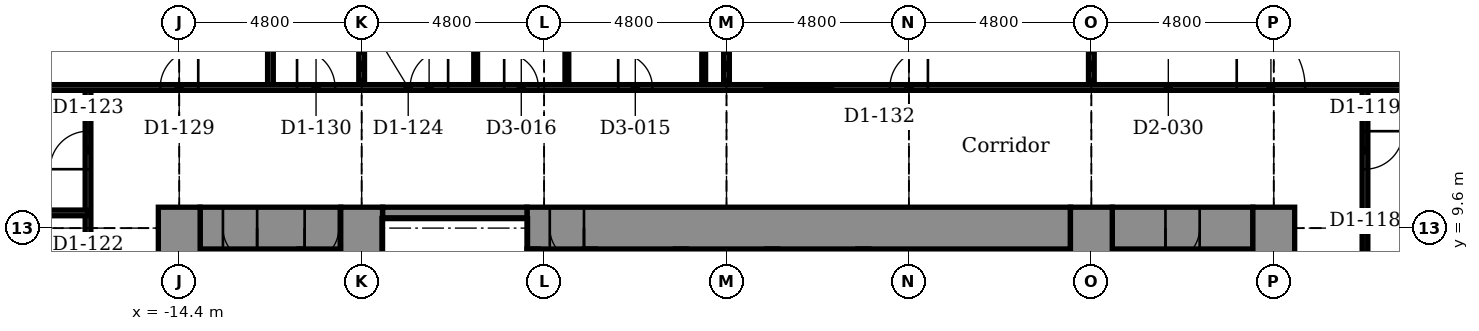
"""IFC4 building model, lengths in metres.
Left out: names, types, materials, properties, quantities, classifications, styles, units other than length and angle.
Written with IfcOpenShell. Run it as: python <this file> out.ifc"""

import sys

from ifc_helpers import new_model, si_unit, direction, frame, frame_2d, origin, place, context, subcontext, project, spatial, rectangle, extrude, element, fill, save


model = new_model("IFC4")
c1 = context("Model", 3, precision=1e-05, world=origin(), true_north=direction((0.0, 1.0)))
c2 = subcontext(c1, "Body", "Model", "MODEL_VIEW")
j1 = project(units=[si_unit("LENGTHUNIT", "METRE"), si_unit("PLANEANGLEUNIT", "RADIAN")], contexts=[c1])
p1 = place(None, origin())
s1 = spatial("IfcSite", under=j1, at=p1, CompositionType="ELEMENT")
p2 = place(p1, origin())
s2 = spatial("IfcBuilding", under=s1, at=p2, CompositionType="ELEMENT")
p3 = place(p2, frame((0.0, 0.0, 44.4)))
s3 = spatial("IfcBuildingStorey", under=s2, at=p3, CompositionType="ELEMENT", Elevation=44.4)
p4 = place(p3, frame((-13.85, 9.6, -0.25), z_axis=(0.0, 0.0, 1.0), x_axis=(1.0, 0.0, 0.0)))
e1 = element("IfcWall", 1, at=p4, inside=s3, PredefinedType="SHEAR", context=c2, shape_type="SweptSolid", body=[
    extrude(rectangle(XDim=3.7, YDim=1.1, at=frame_2d((1.85, 0.0))), origin(), (0.0, 0.0, 1.0), 5.5),
])
p5 = place(p4, frame((0.6, 0.0, 0.25)))
e2 = element("IfcOpeningElement", 2, at=p5, cuts=e1, PredefinedType="OPENING", context=c2, shape_type="SweptSolid", body=[
    extrude(rectangle(XDim=0.9, YDim=2.1, at=frame_2d((0.45, 1.05))), frame((0.0, 0.56, 0.0), z_axis=(0.0, -1.0, 0.0), x_axis=(1.0, 0.0, 0.0)), (0.0, 0.0, 1.0), 1.12),
])
p6 = place(p4, frame((2.75, 0.0, 0.25)))
e3 = element("IfcOpeningElement", 3, at=p6, cuts=e1, PredefinedType="OPENING", context=c2, shape_type="SweptSolid", body=[
    extrude(rectangle(XDim=0.9, YDim=2.1, at=frame_2d((0.45, 1.05))), frame((0.0, 0.56, 0.0), z_axis=(0.0, -1.0, 0.0), x_axis=(1.0, 0.0, 0.0)), (0.0, 0.0, 1.0), 1.12),
])
p7 = place(p3, frame((-5.25, 9.6, -0.25), z_axis=(0.0, 0.0, 1.0), x_axis=(1.0, 0.0, 0.0)))
e4 = element("IfcWall", 4, at=p7, inside=s3, PredefinedType="SHEAR", context=c2, shape_type="SweptSolid", body=[
    extrude(rectangle(XDim=14.3, YDim=1.1, at=frame_2d((7.15, 0.0))), origin(), (0.0, 0.0, 1.0), 5.5),
])
p8 = place(p7, frame((0.6, 0.0, 0.25)))
e5 = element("IfcOpeningElement", 5, at=p8, cuts=e4, PredefinedType="OPENING", context=c2, shape_type="SweptSolid", body=[
    extrude(rectangle(XDim=0.9, YDim=2.1, at=frame_2d((0.45, 1.05))), frame((0.0, 0.56, 0.0), z_axis=(0.0, -1.0, 0.0), x_axis=(1.0, 0.0, 0.0)), (0.0, 0.0, 1.0), 1.12),
])
p9 = place(p3, frame((10.15, 9.6, -0.25), z_axis=(0.0, 0.0, 1.0), x_axis=(1.0, 0.0, 0.0)))
e6 = element("IfcWall", 6, at=p9, inside=s3, PredefinedType="SHEAR", context=c2, shape_type="SweptSolid", body=[
    extrude(rectangle(XDim=3.7, YDim=1.1, at=frame_2d((1.85, 0.0))), origin(), (0.0, 0.0, 1.0), 5.5),
])
p10 = place(p9, frame((1.4, 0.0, 0.25)))
e7 = element("IfcOpeningElement", 7, at=p10, cuts=e6, PredefinedType="OPENING", context=c2, shape_type="SweptSolid", body=[
    extrude(rectangle(XDim=0.9, YDim=2.1, at=frame_2d((0.45, 1.05))), frame((0.0, 0.56, 0.0), z_axis=(0.0, -1.0, 0.0), x_axis=(1.0, 0.0, 0.0)), (0.0, 0.0, 1.0), 1.12),
])
p11 = place(p3, frame((-9.05, 10.0, -0.25), z_axis=(0.0, 0.0, 1.0), x_axis=(1.0, 0.0, 0.0)))
e8 = element("IfcWall", 8, at=p11, inside=s3, PredefinedType="STANDARD", context=c2, shape_type="SweptSolid", body=[
    extrude(rectangle(XDim=3.8, YDim=0.3, at=frame_2d((1.9, 0.0))), origin(), (0.0, 0.0, 1.0), 5.5),
])
p12 = place(p3, frame((-14.4, -10.15, -0.25), z_axis=(0.0, 0.0, 1.0), x_axis=(0.0, 1.0, 0.0)))
e9 = element("IfcWall", 9, at=p12, inside=s3, PredefinedType="SHEAR", context=c2, shape_type="SweptSolid", body=[
    extrude(rectangle(XDim=20.3, YDim=1.1, at=frame_2d((10.15, 0.0))), origin(), (0.0, 0.0, 1.0), 5.5),
])
p13 = place(p12, frame((3.6, 0.0, 0.25)))
e10 = element("IfcOpeningElement", 10, at=p13, cuts=e9, PredefinedType="OPENING", context=c2, shape_type="SweptSolid", body=[
    extrude(rectangle(XDim=1.1, YDim=2.1, at=frame_2d((0.55, 1.05))), frame((0.0, 0.56, 0.0), z_axis=(0.0, -1.0, 0.0), x_axis=(1.0, 0.0, 0.0)), (0.0, 0.0, 1.0), 1.12),
])
p14 = place(p12, frame((6.0, 0.0, 0.25)))
e11 = element("IfcOpeningElement", 11, at=p14, cuts=e9, PredefinedType="OPENING", context=c2, shape_type="SweptSolid", body=[
    extrude(rectangle(XDim=1.1, YDim=2.1, at=frame_2d((0.55, 1.05))), frame((0.0, 0.56, 0.0), z_axis=(0.0, -1.0, 0.0), x_axis=(1.0, 0.0, 0.0)), (0.0, 0.0, 1.0), 1.12),
])
p15 = place(p12, frame((8.4, 0.0, 0.25)))
e12 = element("IfcOpeningElement", 12, at=p15, cuts=e9, PredefinedType="OPENING", context=c2, shape_type="SweptSolid", body=[
    extrude(rectangle(XDim=1.1, YDim=2.1, at=frame_2d((0.55, 1.05))), frame((0.0, 0.56, 0.0), z_axis=(0.0, -1.0, 0.0), x_axis=(1.0, 0.0, 0.0)), (0.0, 0.0, 1.0), 1.12),
])
p16 = place(p12, frame((10.8, 0.0, 0.25)))
e13 = element("IfcOpeningElement", 13, at=p16, cuts=e9, PredefinedType="OPENING", context=c2, shape_type="SweptSolid", body=[
    extrude(rectangle(XDim=1.1, YDim=2.1, at=frame_2d((0.55, 1.05))), frame((0.0, 0.56, 0.0), z_axis=(0.0, -1.0, 0.0), x_axis=(1.0, 0.0, 0.0)), (0.0, 0.0, 1.0), 1.12),
])
p17 = place(p3, frame((-9.6, 2.55, -0.25), z_axis=(0.0, 0.0, 1.0), x_axis=(0.0, 1.0, 0.0)))
e14 = element("IfcWall", 14, at=p17, inside=s3, PredefinedType="SHEAR", context=c2, shape_type="SweptSolid", body=[
    extrude(rectangle(XDim=7.6, YDim=1.1, at=frame_2d((3.8, 0.0))), origin(), (0.0, 0.0, 1.0), 5.5),
])
p18 = place(p3, frame((-5.1, 2.25, -0.25), z_axis=(0.0, 0.0, 1.0), x_axis=(0.0, 1.0, 0.0)))
e15 = element("IfcWall", 15, at=p18, inside=s3, PredefinedType="STANDARD", context=c2, shape_type="SweptSolid", body=[
    extrude(rectangle(XDim=6.8, YDim=0.3, at=frame_2d((3.4, 0.0))), origin(), (0.0, 0.0, 1.0), 5.5),
])
p19 = place(p18, frame((2.0, 0.0, 0.25)))
e16 = element("IfcOpeningElement", 16, at=p19, cuts=e15, PredefinedType="OPENING", context=c2, shape_type="SweptSolid", body=[
    extrude(rectangle(XDim=1.2, YDim=2.1, at=frame_2d((0.6, 1.05))), frame((0.0, 0.16, 0.0), z_axis=(0.0, -1.0, 0.0), x_axis=(1.0, 0.0, 0.0)), (0.0, 0.0, 1.0), 0.32),
])
for number, where, z_axis, x_axis in (
    (17, (-3.6, 5.85, -0.25), (0.0, 0.0, 1.0), (0.0, 1.0, 0.0)),
    (18, (-1.2, 5.85, -0.25), (0.0, 0.0, 1.0), (0.0, 1.0, 0.0)),
    (19, (1.2, 5.85, -0.25), (0.0, 0.0, 1.0), (0.0, 1.0, 0.0)),
    (20, (3.6, 5.85, -0.25), (0.0, 0.0, 1.0), (0.0, 1.0, 0.0)),
):
    element("IfcWall", number, at=place(p3, frame(where, z_axis=z_axis, x_axis=x_axis)), inside=s3, PredefinedType="STANDARD", context=c2, shape_type="SweptSolid", body=[
        extrude(rectangle(XDim=3.2, YDim=0.3, at=frame_2d((1.6, 0.0))), origin(), (0.0, 0.0, 1.0), 5.5),
    ])
p20 = place(p3, frame((9.6, -10.15, -0.25), z_axis=(0.0, 0.0, 1.0), x_axis=(0.0, 1.0, 0.0)))
e21 = element("IfcWall", 21, at=p20, inside=s3, PredefinedType="SHEAR", context=c2, shape_type="SweptSolid", body=[
    extrude(rectangle(XDim=20.3, YDim=1.1, at=frame_2d((10.15, 0.0))), origin(), (0.0, 0.0, 1.0), 5.5),
])
p21 = place(p3, frame((14.4, -10.15, -0.25), z_axis=(0.0, 0.0, 1.0), x_axis=(0.0, 1.0, 0.0)))
e22 = element("IfcWall", 22, at=p21, inside=s3, PredefinedType="SHEAR", context=c2, shape_type="SweptSolid", body=[
    extrude(rectangle(XDim=20.3, YDim=1.1, at=frame_2d((10.15, 0.0))), origin(), (0.0, 0.0, 1.0), 5.5),
])
p22 = place(p21, frame((3.6, 0.0, 0.25)))
e23 = element("IfcOpeningElement", 23, at=p22, cuts=e22, PredefinedType="OPENING", context=c2, shape_type="SweptSolid", body=[
    extrude(rectangle(XDim=1.1, YDim=2.1, at=frame_2d((0.55, 1.05))), frame((0.0, 0.56, 0.0), z_axis=(0.0, -1.0, 0.0), x_axis=(1.0, 0.0, 0.0)), (0.0, 0.0, 1.0), 1.12),
])
p23 = place(p21, frame((6.0, 0.0, 0.25)))
e24 = element("IfcOpeningElement", 24, at=p23, cuts=e22, PredefinedType="OPENING", context=c2, shape_type="SweptSolid", body=[
    extrude(rectangle(XDim=1.1, YDim=2.1, at=frame_2d((0.55, 1.05))), frame((0.0, 0.56, 0.0), z_axis=(0.0, -1.0, 0.0), x_axis=(1.0, 0.0, 0.0)), (0.0, 0.0, 1.0), 1.12),
])
p24 = place(p21, frame((8.4, 0.0, 0.25)))
e25 = element("IfcOpeningElement", 25, at=p24, cuts=e22, PredefinedType="OPENING", context=c2, shape_type="SweptSolid", body=[
    extrude(rectangle(XDim=1.1, YDim=2.1, at=frame_2d((0.55, 1.05))), frame((0.0, 0.56, 0.0), z_axis=(0.0, -1.0, 0.0), x_axis=(1.0, 0.0, 0.0)), (0.0, 0.0, 1.0), 1.12),
])
p25 = place(p21, frame((10.8, 0.0, 0.25)))
e26 = element("IfcOpeningElement", 26, at=p25, cuts=e22, PredefinedType="OPENING", context=c2, shape_type="SweptSolid", body=[
    extrude(rectangle(XDim=1.1, YDim=2.1, at=frame_2d((0.55, 1.05))), frame((0.0, 0.56, 0.0), z_axis=(0.0, -1.0, 0.0), x_axis=(1.0, 0.0, 0.0)), (0.0, 0.0, 1.0), 1.12),
])
p26 = place(p3, frame((16.8, 3.95, 0.0), z_axis=(0.0, 0.0, 1.0), x_axis=(0.0, 1.0, 0.0)))
e27 = element("IfcWall", 27, at=p26, inside=s3, PredefinedType="PARTITIONING", context=c2, shape_type="SweptSolid", body=[
    extrude(rectangle(XDim=9.35, YDim=0.15, at=frame_2d((4.675, 0.0))), origin(), (0.0, 0.0, 1.0), 5.25),
])
p27 = place(p26, frame((1.275, 0.0, 0.0)))
e28 = element("IfcOpeningElement", 28, at=p27, cuts=e27, PredefinedType="OPENING", context=c2, shape_type="SweptSolid", body=[
    extrude(rectangle(XDim=1.0, YDim=2.1, at=frame_2d((0.5, 1.05))), frame((0.0, 0.085, 0.0), z_axis=(0.0, -1.0, 0.0), x_axis=(1.0, 0.0, 0.0)), (0.0, 0.0, 1.0), 0.17),
])
p28 = place(p26, frame((3.745, 0.0, 0.0)))
e29 = element("IfcOpeningElement", 29, at=p28, cuts=e27, PredefinedType="OPENING", context=c2, shape_type="SweptSolid", body=[
    extrude(rectangle(XDim=1.0, YDim=2.1, at=frame_2d((0.5, 1.05))), frame((0.0, 0.085, 0.0), z_axis=(0.0, -1.0, 0.0), x_axis=(1.0, 0.0, 0.0)), (0.0, 0.0, 1.0), 0.17),
])
p29 = place(p26, frame((7.2, 0.0, 0.0)))
e30 = element("IfcOpeningElement", 30, at=p29, cuts=e27, PredefinedType="OPENING", context=c2, shape_type="SweptSolid", body=[
    extrude(rectangle(XDim=1.0, YDim=2.1, at=frame_2d((0.5, 1.05))), frame((0.0, 0.085, 0.0), z_axis=(0.0, -1.0, 0.0), x_axis=(1.0, 0.0, 0.0)), (0.0, 0.0, 1.0), 0.17),
])
for number, where, z_axis, x_axis in (
    (31, (9.6, 13.3, 0.0), (0.0, 0.0, 1.0), (0.0, 1.0, 0.0)),
    (32, (0.0, 13.3, 0.0), (0.0, 0.0, 1.0), (0.0, 1.0, 0.0)),
):
    element("IfcWall", number, at=place(p3, frame(where, z_axis=z_axis, x_axis=x_axis)), inside=s3, PredefinedType="PARTITIONING", context=c2, shape_type="SweptSolid", body=[
        extrude(rectangle(XDim=5.3, YDim=0.15, at=frame_2d((2.65, 0.0))), origin(), (0.0, 0.0, 1.0), 4.793),
    ])
for number, where, z_axis, x_axis in (
    (33, (-0.6, 13.3, 0.0), (0.0, 0.0, 1.0), (0.0, 1.0, 0.0)),
    (34, (-4.2, 13.3, 0.0), (0.0, 0.0, 1.0), (0.0, 1.0, 0.0)),
    (35, (-6.6, 13.3, 0.0), (0.0, 0.0, 1.0), (0.0, 1.0, 0.0)),
):
    element("IfcWall", number, at=place(p3, frame(where, z_axis=z_axis, x_axis=x_axis)), inside=s3, PredefinedType="PARTITIONING", context=c2, shape_type="SweptSolid", body=[
        extrude(rectangle(XDim=4.8, YDim=0.1, at=frame_2d((2.4, 0.0))), origin(), (0.0, 0.0, 1.0), 5.25),
    ])
p30 = place(p3, frame((-9.6, 13.3, 0.0), z_axis=(0.0, 0.0, 1.0), x_axis=(0.0, 1.0, 0.0)))
e36 = element("IfcWall", 36, at=p30, inside=s3, PredefinedType="PARTITIONING", context=c2, shape_type="SweptSolid", body=[
    extrude(rectangle(XDim=5.3, YDim=0.15, at=frame_2d((2.65, 0.0))), origin(), (0.0, 0.0, 1.0), 4.793),
])
p31 = place(p3, frame((-11.2, 7.35, 0.0), z_axis=(0.0, 0.0, 1.0), x_axis=(0.0, 1.0, 0.0)))
e37 = element("IfcWall", 37, at=p31, inside=s3, PredefinedType="PARTITIONING", context=c2, shape_type="SweptSolid", body=[
    extrude(rectangle(XDim=1.7, YDim=0.1, at=frame_2d((0.85, 0.0))), origin(), (0.0, 0.0, 1.0), 5.25),
])
p32 = place(p3, frame((-12.0, 13.3, 0.0), z_axis=(0.0, 0.0, 1.0), x_axis=(0.0, 1.0, 0.0)))
e38 = element("IfcWall", 38, at=p32, inside=s3, PredefinedType="PARTITIONING", context=c2, shape_type="SweptSolid", body=[
    extrude(rectangle(XDim=18.285, YDim=0.15, at=frame_2d((9.143, 0.0))), origin(), (0.0, 0.0, 1.0), 5.25),
])
p33 = place(p3, frame((-16.8, 3.95, 0.0), z_axis=(0.0, 0.0, 1.0), x_axis=(0.0, 1.0, 0.0)))
e39 = element("IfcWall", 39, at=p33, inside=s3, PredefinedType="PARTITIONING", context=c2, shape_type="SweptSolid", body=[
    extrude(rectangle(XDim=9.35, YDim=0.15, at=frame_2d((4.675, 0.0))), origin(), (0.0, 0.0, 1.0), 5.25),
])
p34 = place(p33, frame((3.615, 0.0, 0.0)))
e40 = element("IfcOpeningElement", 40, at=p34, cuts=e39, PredefinedType="OPENING", context=c2, shape_type="SweptSolid", body=[
    extrude(rectangle(XDim=1.0, YDim=2.1, at=frame_2d((0.5, 1.05))), frame((0.0, 0.085, 0.0), z_axis=(0.0, -1.0, 0.0), x_axis=(1.0, 0.0, 0.0)), (0.0, 0.0, 1.0), 0.17),
])
p35 = place(p33, frame((7.2, 0.0, 0.0)))
e41 = element("IfcOpeningElement", 41, at=p35, cuts=e39, PredefinedType="OPENING", context=c2, shape_type="SweptSolid", body=[
    extrude(rectangle(XDim=1.0, YDim=2.1, at=frame_2d((0.5, 1.05))), frame((0.0, 0.085, 0.0), z_axis=(0.0, -1.0, 0.0), x_axis=(1.0, 0.0, 0.0)), (0.0, 0.0, 1.0), 0.17),
])
p36 = place(p3, frame((16.8, 9.6, 0.0), z_axis=(0.0, 0.0, 1.0), x_axis=(1.0, 0.0, 0.0)))
e42 = element("IfcWall", 42, at=p36, inside=s3, PredefinedType="PARTITIONING", context=c2, shape_type="SweptSolid", body=[
    extrude(rectangle(XDim=1.8, YDim=0.15, at=frame_2d((0.9, 0.0))), origin(), (0.0, 0.0, 1.0), 4.642),
])
p37 = place(p3, frame((-18.6, 10.0, 0.0), z_axis=(0.0, 0.0, 1.0), x_axis=(1.0, 0.0, 0.0)))
e43 = element("IfcWall", 43, at=p37, inside=s3, PredefinedType="PARTITIONING", context=c2, shape_type="SweptSolid", body=[
    extrude(rectangle(XDim=1.8, YDim=0.15, at=frame_2d((0.9, 0.0))), origin(), (0.0, 0.0, 1.0), 5.25),
])
p38 = place(p3, frame((-24.0, 13.3, 0.0), z_axis=(0.0, 0.0, 1.0), x_axis=(1.0, 0.0, 0.0)))
e44 = element("IfcWall", 44, at=p38, inside=s3, PredefinedType="PARTITIONING", context=c2, shape_type="SweptSolid", body=[
    extrude(rectangle(XDim=48.0, YDim=0.15, at=frame_2d((24.0, 0.0))), origin(), (0.0, 0.0, 1.0), 5.25),
])
p39 = place(p38, frame((9.1, 0.0, 0.0)))
e45 = element("IfcOpeningElement", 45, at=p39, cuts=e44, PredefinedType="OPENING", context=c2, shape_type="SweptSolid", body=[
    extrude(rectangle(XDim=1.0, YDim=2.1, at=frame_2d((0.5, 1.05))), frame((0.0, 0.085, 0.0), z_axis=(0.0, -1.0, 0.0), x_axis=(1.0, 0.0, 0.0)), (0.0, 0.0, 1.0), 0.17),
])
p40 = place(p38, frame((12.7, 0.0, 0.0)))
e46 = element("IfcOpeningElement", 46, at=p40, cuts=e44, PredefinedType="OPENING", context=c2, shape_type="SweptSolid", body=[
    extrude(rectangle(XDim=1.0, YDim=2.1, at=frame_2d((0.5, 1.05))), frame((0.0, 0.085, 0.0), z_axis=(0.0, -1.0, 0.0), x_axis=(1.0, 0.0, 0.0)), (0.0, 0.0, 1.0), 0.17),
])
p41 = place(p38, frame((15.675, 0.0, 0.0)))
e47 = element("IfcOpeningElement", 47, at=p41, cuts=e44, PredefinedType="OPENING", context=c2, shape_type="SweptSolid", body=[
    extrude(rectangle(XDim=1.0, YDim=2.1, at=frame_2d((0.5, 1.05))), frame((0.0, 0.085, 0.0), z_axis=(0.0, -1.0, 0.0), x_axis=(1.0, 0.0, 0.0)), (0.0, 0.0, 1.0), 0.17),
])
p42 = place(p38, frame((28.3, 0.0, 0.0)))
e48 = element("IfcOpeningElement", 48, at=p42, cuts=e44, PredefinedType="OPENING", context=c2, shape_type="SweptSolid", body=[
    extrude(rectangle(XDim=1.0, YDim=2.1, at=frame_2d((0.5, 1.05))), frame((0.0, 0.085, 0.0), z_axis=(0.0, -1.0, 0.0), x_axis=(1.0, 0.0, 0.0)), (0.0, 0.0, 1.0), 0.17),
])
p43 = place(p38, frame((37.425, 0.0, 0.0)))
e49 = element("IfcOpeningElement", 49, at=p43, cuts=e44, PredefinedType="OPENING", context=c2, shape_type="SweptSolid", body=[
    extrude(rectangle(XDim=1.8, YDim=2.1, at=frame_2d((0.9, 1.05))), frame((0.0, 0.085, 0.0), z_axis=(0.0, -1.0, 0.0), x_axis=(1.0, 0.0, 0.0)), (0.0, 0.0, 1.0), 0.17),
])
p44 = place(p38, frame((21.15, 0.0, 0.0)))
e50 = element("IfcOpeningElement", 50, at=p44, cuts=e44, PredefinedType="OPENING", context=c2, shape_type="SweptSolid", body=[
    extrude(rectangle(XDim=0.9, YDim=2.1, at=frame_2d((0.45, 1.05))), frame((0.0, 0.085, 0.0), z_axis=(0.0, -1.0, 0.0), x_axis=(1.0, 0.0, 0.0)), (0.0, 0.0, 1.0), 0.17),
])
p45 = place(p38, frame((18.15, 0.0, 0.0)))
e51 = element("IfcOpeningElement", 51, at=p45, cuts=e44, PredefinedType="OPENING", context=c2, shape_type="SweptSolid", body=[
    extrude(rectangle(XDim=0.9, YDim=2.1, at=frame_2d((0.45, 1.05))), frame((0.0, 0.085, 0.0), z_axis=(0.0, -1.0, 0.0), x_axis=(1.0, 0.0, 0.0)), (0.0, 0.0, 1.0), 0.17),
])
p46 = place(p38, frame((25.0, 0.0, 0.9)))
e52 = element("IfcOpeningElement", 52, at=p46, cuts=e44, PredefinedType="OPENING", context=c2, shape_type="SweptSolid", body=[
    extrude(rectangle(XDim=1.8, YDim=1.5, at=frame_2d((0.9, 0.75))), frame((0.0, 0.085, 0.0), z_axis=(0.0, -1.0, 0.0), x_axis=(1.0, 0.0, 0.0)), (0.0, 0.0, 1.0), 0.17),
])
p47 = place(p39, origin())
e53 = element("IfcDoor", 53, at=p47, inside=s3, OperationType="SINGLE_SWING_RIGHT", PredefinedType="DOOR", context=c2, shape_type="SweptSolid", body=[
    extrude(rectangle(XDim=1.0, YDim=2.1, at=frame_2d((0.5, 1.05))), frame((0.0, 0.025, 0.0), z_axis=(0.0, -1.0, 0.0), x_axis=(1.0, 0.0, 0.0)), (0.0, 0.0, 1.0), 0.05),
])
fill(e45, e53)
p48 = place(p40, origin())
e54 = element("IfcDoor", 54, at=p48, inside=s3, OperationType="SINGLE_SWING_LEFT", PredefinedType="DOOR", context=c2, shape_type="SweptSolid", body=[
    extrude(rectangle(XDim=1.0, YDim=2.1, at=frame_2d((0.5, 1.05))), frame((0.0, 0.025, 0.0), z_axis=(0.0, -1.0, 0.0), x_axis=(1.0, 0.0, 0.0)), (0.0, 0.0, 1.0), 0.05),
])
fill(e46, e54)
p49 = place(p41, origin())
e55 = element("IfcDoor", 55, at=p49, inside=s3, OperationType="SINGLE_SWING_RIGHT", PredefinedType="DOOR", context=c2, shape_type="SweptSolid", body=[
    extrude(rectangle(XDim=1.0, YDim=2.1, at=frame_2d((0.5, 1.05))), frame((0.0, 0.025, 0.0), z_axis=(0.0, -1.0, 0.0), x_axis=(1.0, 0.0, 0.0)), (0.0, 0.0, 1.0), 0.05),
])
fill(e47, e55)
p50 = place(p42, origin())
e56 = element("IfcDoor", 56, at=p50, inside=s3, OperationType="SINGLE_SWING_RIGHT", PredefinedType="DOOR", context=c2, shape_type="SweptSolid", body=[
    extrude(rectangle(XDim=1.0, YDim=2.1, at=frame_2d((0.5, 1.05))), frame((0.0, 0.025, 0.0), z_axis=(0.0, -1.0, 0.0), x_axis=(1.0, 0.0, 0.0)), (0.0, 0.0, 1.0), 0.05),
])
fill(e48, e56)
p51 = place(p43, origin())
e57 = element("IfcDoor", 57, at=p51, inside=s3, OperationType="SINGLE_SWING_LEFT", PredefinedType="DOOR", context=c2, shape_type="SweptSolid", body=[
    extrude(rectangle(XDim=1.8, YDim=2.1, at=frame_2d((0.9, 1.05))), frame((0.0, 0.025, 0.0), z_axis=(0.0, -1.0, 0.0), x_axis=(1.0, 0.0, 0.0)), (0.0, 0.0, 1.0), 0.05),
])
fill(e49, e57)
p52 = place(p29, frame((1.0, 0.0, 0.0), z_axis=(0.0, 0.0, 1.0), x_axis=(-1.0, 0.0, 0.0)))
e58 = element("IfcDoor", 58, at=p52, inside=s3, OperationType="SINGLE_SWING_RIGHT", PredefinedType="DOOR", context=c2, shape_type="SweptSolid", body=[
    extrude(rectangle(XDim=1.0, YDim=2.1, at=frame_2d((0.5, 1.05))), frame((0.0, 0.025, 0.0), z_axis=(0.0, -1.0, 0.0), x_axis=(1.0, 0.0, 0.0)), (0.0, 0.0, 1.0), 0.05),
])
fill(e30, e58)
p53 = place(p35, origin())
e59 = element("IfcDoor", 59, at=p53, inside=s3, OperationType="SINGLE_SWING_LEFT", PredefinedType="DOOR", context=c2, shape_type="SweptSolid", body=[
    extrude(rectangle(XDim=1.0, YDim=2.1, at=frame_2d((0.5, 1.05))), frame((0.0, 0.025, 0.0), z_axis=(0.0, -1.0, 0.0), x_axis=(1.0, 0.0, 0.0)), (0.0, 0.0, 1.0), 0.05),
])
fill(e41, e59)
p54 = place(p44, origin())
e60 = element("IfcDoor", 60, at=p54, inside=s3, OperationType="SINGLE_SWING_LEFT", PredefinedType="DOOR", context=c2, shape_type="SweptSolid", body=[
    extrude(rectangle(XDim=0.9, YDim=2.1, at=frame_2d((0.45, 1.05))), frame((0.0, 0.025, 0.0), z_axis=(0.0, -1.0, 0.0), x_axis=(1.0, 0.0, 0.0)), (0.0, 0.0, 1.0), 0.05),
])
fill(e50, e60)
p55 = place(p45, origin())
e61 = element("IfcDoor", 61, at=p55, inside=s3, OperationType="SINGLE_SWING_LEFT", PredefinedType="DOOR", context=c2, shape_type="SweptSolid", body=[
    extrude(rectangle(XDim=0.9, YDim=2.1, at=frame_2d((0.45, 1.05))), frame((0.0, 0.025, 0.0), z_axis=(0.0, -1.0, 0.0), x_axis=(1.0, 0.0, 0.0)), (0.0, 0.0, 1.0), 0.05),
])
fill(e51, e61)
p56 = place(p10, frame((0.9, 0.0, 0.0), z_axis=(0.0, 0.0, 1.0), x_axis=(-1.0, 0.0, 0.0)))
e62 = element("IfcDoor", 62, at=p56, inside=s3, OperationType="SINGLE_SWING_LEFT", PredefinedType="DOOR", context=c2, shape_type="SweptSolid", body=[
    extrude(rectangle(XDim=0.9, YDim=2.1, at=frame_2d((0.45, 1.05))), frame((0.0, 0.025, 0.0), z_axis=(0.0, -1.0, 0.0), x_axis=(1.0, 0.0, 0.0)), (0.0, 0.0, 1.0), 0.05),
])
fill(e7, e62)
p57 = place(p5, frame((0.9, 0.0, 0.0), z_axis=(0.0, 0.0, 1.0), x_axis=(-1.0, 0.0, 0.0)))
e63 = element("IfcDoor", 63, at=p57, inside=s3, OperationType="SINGLE_SWING_RIGHT", PredefinedType="DOOR", context=c2, shape_type="SweptSolid", body=[
    extrude(rectangle(XDim=0.9, YDim=2.1, at=frame_2d((0.45, 1.05))), frame((0.0, 0.025, 0.0), z_axis=(0.0, -1.0, 0.0), x_axis=(1.0, 0.0, 0.0)), (0.0, 0.0, 1.0), 0.05),
])
fill(e2, e63)
p58 = place(p6, frame((0.9, 0.0, 0.0), z_axis=(0.0, 0.0, 1.0), x_axis=(-1.0, 0.0, 0.0)))
e64 = element("IfcDoor", 64, at=p58, inside=s3, OperationType="SINGLE_SWING_LEFT", PredefinedType="DOOR", context=c2, shape_type="SweptSolid", body=[
    extrude(rectangle(XDim=0.9, YDim=2.1, at=frame_2d((0.45, 1.05))), frame((0.0, 0.025, 0.0), z_axis=(0.0, -1.0, 0.0), x_axis=(1.0, 0.0, 0.0)), (0.0, 0.0, 1.0), 0.05),
])
fill(e3, e64)
p59 = place(p8, frame((0.9, 0.0, 0.0), z_axis=(0.0, 0.0, 1.0), x_axis=(-1.0, 0.0, 0.0)))
e65 = element("IfcDoor", 65, at=p59, inside=s3, OperationType="SINGLE_SWING_RIGHT", PredefinedType="DOOR", context=c2, shape_type="SweptSolid", body=[
    extrude(rectangle(XDim=0.9, YDim=2.1, at=frame_2d((0.45, 1.05))), frame((0.0, 0.025, 0.0), z_axis=(0.0, -1.0, 0.0), x_axis=(1.0, 0.0, 0.0)), (0.0, 0.0, 1.0), 0.05),
])
fill(e5, e65)
p60 = place(p46, origin())
e66 = element("IfcWindow", 66, at=p60, inside=s3, PartitioningType="SINGLE_PANEL", PredefinedType="WINDOW", context=c2, shape_type="SweptSolid", body=[
    extrude(rectangle(XDim=1.8, YDim=1.5, at=frame_2d((0.9, 0.75))), frame((0.0, 0.03, 0.0), z_axis=(0.0, -1.0, 0.0), x_axis=(1.0, 0.0, 0.0)), (0.0, 0.0, 1.0), 0.06),
])
fill(e52, e66)
save(model, sys.argv[1])
